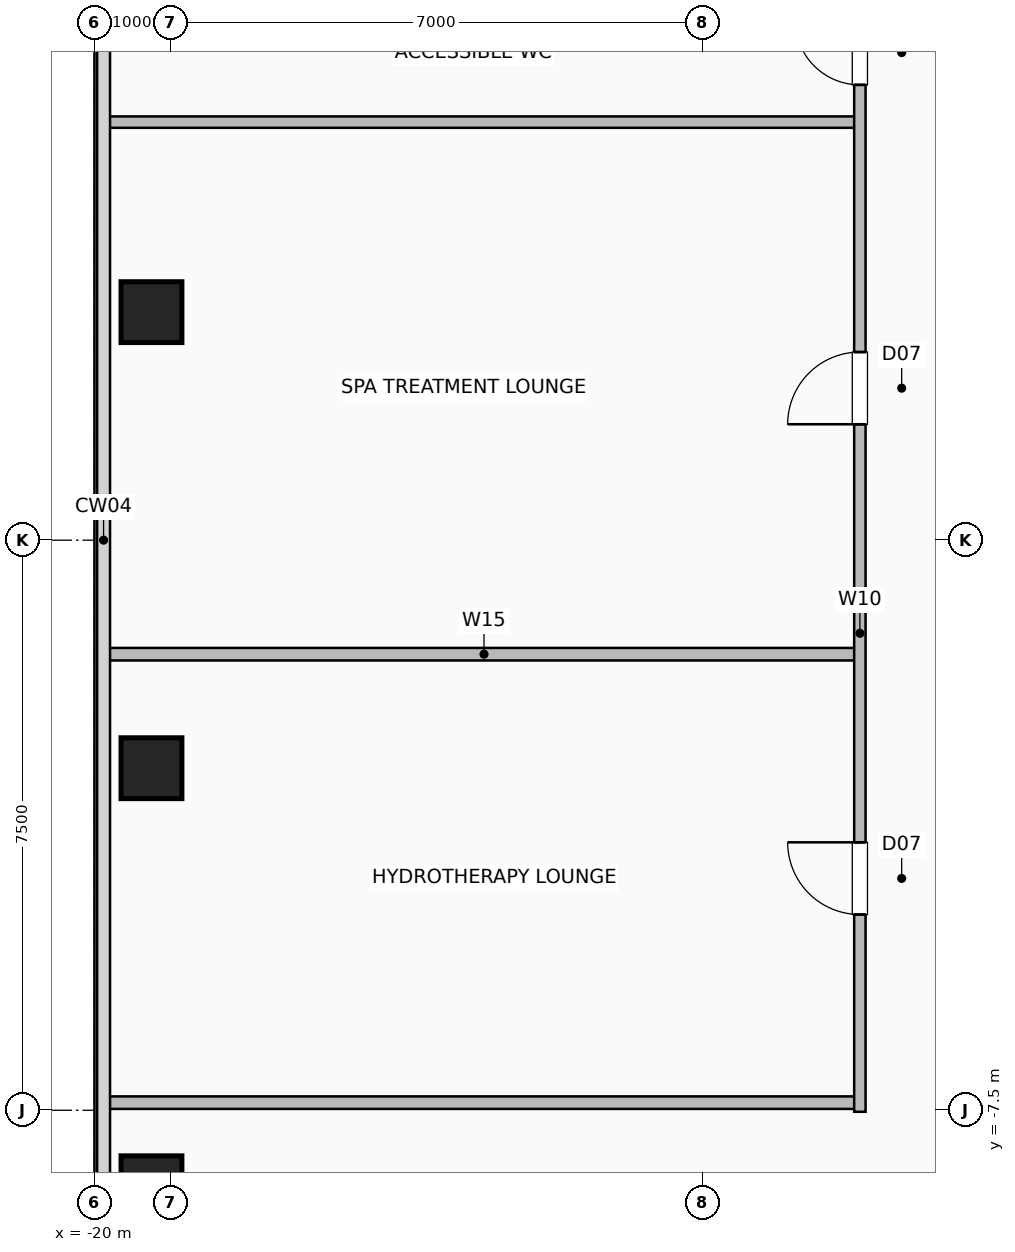
"""IFC4 building model, lengths in metres.
Left out: names, types, materials, properties, quantities, classifications, styles, units other than length and angle.
Written with IfcOpenShell. Run it as: python <this file> out.ifc"""

import sys

from ifc_helpers import new_model, si_unit, direction, frame, frame_2d, origin, origin_2d, place, context, subcontext, project, spatial, rectangle, hollow_rectangle, extrude, element, fill, save


model = new_model("IFC4")
c1 = context("Model", 3, precision=1e-05, world=origin(), true_north=direction((0.0, 1.0)))
c2 = subcontext(c1, "Body", "Model", "MODEL_VIEW")
j1 = project(units=[si_unit("LENGTHUNIT", "METRE"), si_unit("PLANEANGLEUNIT", "RADIAN")], contexts=[c1])
p1 = place(None, origin())
s1 = spatial("IfcSite", under=j1, at=p1, CompositionType="ELEMENT")
p2 = place(p1, origin())
s2 = spatial("IfcBuilding", under=s1, at=p2, CompositionType="ELEMENT")
p3 = place(p2, frame((0.0, 0.0, 202.2)))
s3 = spatial("IfcBuildingStorey", under=s2, at=p3, CompositionType="ELEMENT", Elevation=202.2)
for number, where, z_axis, x_axis in (
    (1, (-19.25, -8.5, 0.0), (0.0, 0.0, 1.0), (1.0, 0.0, 0.0)),
    (2, (-19.25, -3.0, 0.0), (0.0, 0.0, 1.0), (1.0, 0.0, 0.0)),
    (3, (-19.25, 3.0, 0.0), (0.0, 0.0, 1.0), (1.0, 0.0, 0.0)),
):
    element("IfcColumn", number, at=place(p3, frame(where, z_axis=z_axis, x_axis=x_axis)), inside=s3, PredefinedType="COLUMN", context=c2, shape_type="SweptSolid", body=[
        extrude(hollow_rectangle(XDim=0.8, YDim=0.8, WallThickness=0.04, at=origin_2d()), origin(), (0.0, 0.0, 1.0), 3.6),
    ])
for number, where, z_axis, x_axis in (
    (4, (-19.82, -7.4, 0.0), (0.0, 0.0, 1.0), (1.0, 0.0, 0.0)),
    (5, (-19.82, -1.5, 0.0), (0.0, 0.0, 1.0), (1.0, 0.0, 0.0)),
):
    element("IfcWall", number, at=place(p3, frame(where, z_axis=z_axis, x_axis=x_axis)), inside=s3, PredefinedType="PLUMBINGWALL", context=c2, shape_type="SweptSolid", body=[
        extrude(rectangle(XDim=9.89, YDim=0.165, at=frame_2d((4.945, 0.0))), origin(), (0.0, 0.0, 1.0), 3.36),
    ])
p4 = place(p3, frame((-19.82, 5.5, 0.0), z_axis=(0.0, 0.0, 1.0), x_axis=(1.0, 0.0, 0.0)))
e6 = element("IfcWall", 6, at=p4, inside=s3, PredefinedType="PARTITIONING", context=c2, shape_type="SweptSolid", body=[
    extrude(rectangle(XDim=9.89, YDim=0.15, at=frame_2d((4.945, 0.0))), origin(), (0.0, 0.0, 1.0), 3.36),
])
p5 = place(p3, frame((-9.93, -7.52, 0.0), z_axis=(0.0, 0.0, 1.0), x_axis=(0.0, 1.0, 0.0)))
e7 = element("IfcWall", 7, at=p5, inside=s3, PredefinedType="PARTITIONING", context=c2, shape_type="SweptSolid", body=[
    extrude(rectangle(XDim=21.59, YDim=0.15, at=frame_2d((10.795, 0.0))), origin(), (0.0, 0.0, 1.0), 3.36),
])
p6 = place(p5, frame((2.595, 0.0, 0.0)))
e8 = element("IfcOpeningElement", 8, at=p6, cuts=e7, PredefinedType="OPENING", context=c2, shape_type="SweptSolid", body=[
    extrude(rectangle(XDim=0.95, YDim=2.06, at=frame_2d((0.475, 1.03))), frame((0.0, 0.085, 0.0), z_axis=(0.0, -1.0, 0.0), x_axis=(1.0, 0.0, 0.0)), (0.0, 0.0, 1.0), 0.17),
])
p7 = place(p5, frame((9.045, 0.0, 0.0)))
e9 = element("IfcOpeningElement", 9, at=p7, cuts=e7, PredefinedType="OPENING", context=c2, shape_type="SweptSolid", body=[
    extrude(rectangle(XDim=0.95, YDim=2.06, at=frame_2d((0.475, 1.03))), frame((0.0, 0.085, 0.0), z_axis=(0.0, -1.0, 0.0), x_axis=(1.0, 0.0, 0.0)), (0.0, 0.0, 1.0), 0.17),
])
p8 = place(p5, frame((13.51, 0.0, 0.0)))
e10 = element("IfcOpeningElement", 10, at=p8, cuts=e7, PredefinedType="OPENING", context=c2, shape_type="SweptSolid", body=[
    extrude(rectangle(XDim=0.85, YDim=2.05, at=frame_2d((0.425, 1.025))), frame((0.0, 0.085, 0.0), z_axis=(0.0, -1.0, 0.0), x_axis=(1.0, 0.0, 0.0)), (0.0, 0.0, 1.0), 0.17),
])
p9 = place(p5, frame((17.685, 0.0, 0.0)))
e11 = element("IfcOpeningElement", 11, at=p9, cuts=e7, PredefinedType="OPENING", context=c2, shape_type="SweptSolid", body=[
    extrude(rectangle(XDim=0.95, YDim=2.06, at=frame_2d((0.475, 1.03))), frame((0.0, 0.085, 0.0), z_axis=(0.0, -1.0, 0.0), x_axis=(1.0, 0.0, 0.0)), (0.0, 0.0, 1.0), 0.17),
])
p10 = place(p6, origin())
e12 = element("IfcDoor", 12, at=p10, inside=s3, OperationType="SINGLE_SWING_RIGHT", PredefinedType="DOOR", context=c2, shape_type="SweptSolid", body=[
    extrude(rectangle(XDim=0.95, YDim=2.06, at=frame_2d((0.475, 1.03))), frame((0.0, 0.025, 0.0), z_axis=(0.0, -1.0, 0.0), x_axis=(1.0, 0.0, 0.0)), (0.0, 0.0, 1.0), 0.05),
])
fill(e8, e12)
p11 = place(p7, origin())
e13 = element("IfcDoor", 13, at=p11, inside=s3, OperationType="SINGLE_SWING_LEFT", PredefinedType="DOOR", context=c2, shape_type="SweptSolid", body=[
    extrude(rectangle(XDim=0.95, YDim=2.06, at=frame_2d((0.475, 1.03))), frame((0.0, 0.025, 0.0), z_axis=(0.0, -1.0, 0.0), x_axis=(1.0, 0.0, 0.0)), (0.0, 0.0, 1.0), 0.05),
])
fill(e9, e13)
p12 = place(p8, origin())
e14 = element("IfcDoor", 14, at=p12, inside=s3, OperationType="SINGLE_SWING_RIGHT", PredefinedType="DOOR", context=c2, shape_type="SweptSolid", body=[
    extrude(rectangle(XDim=0.85, YDim=2.05, at=frame_2d((0.425, 1.025))), frame((0.0, 0.025, 0.0), z_axis=(0.0, -1.0, 0.0), x_axis=(1.0, 0.0, 0.0)), (0.0, 0.0, 1.0), 0.05),
])
fill(e10, e14)
save(model, sys.argv[1])
